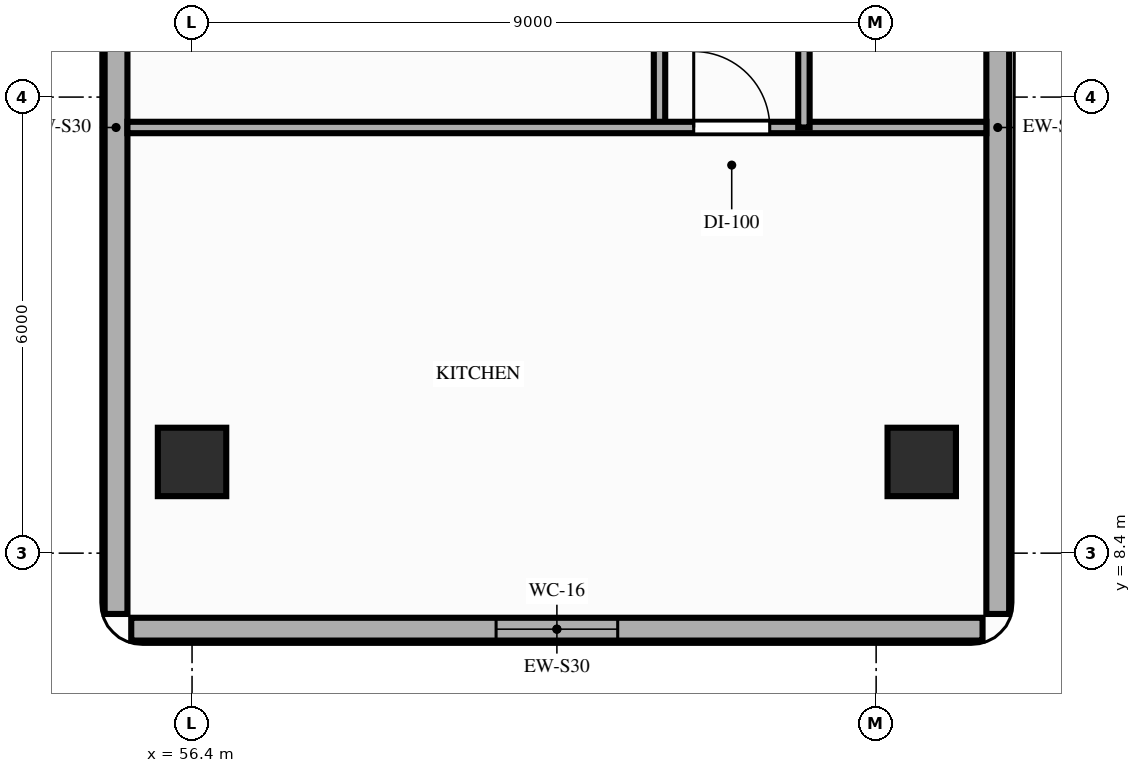
"""IFC4 building model, lengths in metres.
Left out: names, types, materials, properties, quantities, classifications, styles, units other than length and angle.
Written with IfcOpenShell. Run it as: python <this file> out.ifc"""

import sys

from ifc_helpers import new_model, si_unit, direction, frame, frame_2d, origin, origin_2d, place, context, subcontext, project, spatial, rectangle, extrude, element, fill, save


model = new_model("IFC4")
c1 = context("Model", 3, precision=1e-05, world=origin(), true_north=direction((0.0, 1.0)))
c2 = subcontext(c1, "Body", "Model", "MODEL_VIEW")
j1 = project(units=[si_unit("LENGTHUNIT", "METRE"), si_unit("PLANEANGLEUNIT", "RADIAN")], contexts=[c1])
p1 = place(None, origin())
s1 = spatial("IfcSite", under=j1, at=p1, CompositionType="ELEMENT")
p2 = place(p1, origin())
s2 = spatial("IfcBuilding", under=s1, at=p2, CompositionType="ELEMENT")
p3 = place(p2, frame((0.0, 0.0, 75.6)))
s3 = spatial("IfcBuildingStorey", under=s2, at=p3, CompositionType="ELEMENT", Elevation=75.6)
for number, where, z_axis, x_axis in (
    (1, (56.4, 9.6, 0.0), (0.0, 0.0, 1.0), (1.0, 0.0, 0.0)),
    (2, (66.0, 9.6, 0.0), (0.0, 0.0, 1.0), (1.0, 0.0, 0.0)),
):
    element("IfcColumn", number, at=place(p3, frame(where, z_axis=z_axis, x_axis=x_axis)), inside=s3, PredefinedType="COLUMN", context=c2, shape_type="SweptSolid", body=[
        extrude(rectangle(XDim=0.9, YDim=0.9, at=origin_2d()), origin(), (0.0, 0.0, 1.0), 3.8),
    ])
p4 = place(p3, frame((55.6, 7.4, 0.0), z_axis=(0.0, 0.0, 1.0), x_axis=(1.0, 0.0, 0.0)))
e3 = element("IfcWall", 3, at=p4, inside=s3, PredefinedType="STANDARD", context=c2, shape_type="SweptSolid", body=[
    extrude(rectangle(XDim=11.2, YDim=0.3, at=frame_2d((5.6, 0.0))), origin(), (0.0, 0.0, 1.0), 3.56),
])
p5 = place(p4, frame((4.8, 0.0, 0.85)))
e4 = element("IfcOpeningElement", 4, at=p5, cuts=e3, PredefinedType="OPENING", context=c2, shape_type="SweptSolid", body=[
    extrude(rectangle(XDim=1.6, YDim=1.7, at=frame_2d((0.8, 0.85))), frame((0.0, 0.16, 0.0), z_axis=(0.0, -1.0, 0.0), x_axis=(1.0, 0.0, 0.0)), (0.0, 0.0, 1.0), 0.32),
])
for number, where, z_axis, x_axis in (
    (5, (55.4, 20.4, 0.0), (0.0, 0.0, 1.0), (0.0, -1.0, 0.0)),
    (6, (67.0, 7.6, 0.0), (0.0, 0.0, 1.0), (0.0, 1.0, 0.0)),
):
    element("IfcWall", number, at=place(p3, frame(where, z_axis=z_axis, x_axis=x_axis)), inside=s3, PredefinedType="STANDARD", context=c2, shape_type="SweptSolid", body=[
        extrude(rectangle(XDim=12.8, YDim=0.3, at=frame_2d((6.4, 0.0))), origin(), (0.0, 0.0, 1.0), 3.56),
    ])
p6 = place(p3, frame((62.55, 14.0, 0.0), z_axis=(0.0, 0.0, 1.0), x_axis=(0.0, 1.0, 0.0)))
e7 = element("IfcWall", 7, at=p6, inside=s3, PredefinedType="PARTITIONING", context=c2, shape_type="SweptSolid", body=[
    extrude(rectangle(XDim=6.75, YDim=0.15, at=frame_2d((3.375, 0.0))), origin(), (0.0, 0.0, 1.0), 3.14),
])
p7 = place(p6, frame((2.6, 0.0, 0.0)))
e8 = element("IfcOpeningElement", 8, at=p7, cuts=e7, PredefinedType="OPENING", context=c2, shape_type="SweptSolid", body=[
    extrude(rectangle(XDim=0.95, YDim=2.15, at=frame_2d((0.475, 1.075))), frame((0.0, 0.085, 0.0), z_axis=(0.0, -1.0, 0.0), x_axis=(1.0, 0.0, 0.0)), (0.0, 0.0, 1.0), 0.17),
])
p8 = place(p3, frame((55.55, 14.0, 0.0), z_axis=(0.0, 0.0, 1.0), x_axis=(1.0, 0.0, 0.0)))
e9 = element("IfcWall", 9, at=p8, inside=s3, PredefinedType="PARTITIONING", context=c2, shape_type="SweptSolid", body=[
    extrude(rectangle(XDim=11.3, YDim=0.15, at=frame_2d((5.65, 0.0))), origin(), (0.0, 0.0, 1.0), 3.14),
])
p9 = place(p8, frame((7.45, 0.0, 0.0)))
e10 = element("IfcOpeningElement", 10, at=p9, cuts=e9, PredefinedType="OPENING", context=c2, shape_type="SweptSolid", body=[
    extrude(rectangle(XDim=1.0, YDim=2.15, at=frame_2d((0.5, 1.075))), frame((0.0, 0.085, 0.0), z_axis=(0.0, -1.0, 0.0), x_axis=(1.0, 0.0, 0.0)), (0.0, 0.0, 1.0), 0.17),
])
p10 = place(p3, frame((64.45, 14.0, 0.0), z_axis=(0.0, 0.0, 1.0), x_axis=(0.0, 1.0, 0.0)))
e11 = element("IfcWall", 11, at=p10, inside=s3, PredefinedType="PARTITIONING", context=c2, shape_type="SweptSolid", body=[
    extrude(rectangle(XDim=6.75, YDim=0.15, at=frame_2d((3.375, 0.0))), origin(), (0.0, 0.0, 1.0), 3.14),
])
p11 = place(p10, frame((3.24, 0.0, 0.0)))
e12 = element("IfcOpeningElement", 12, at=p11, cuts=e11, PredefinedType="OPENING", context=c2, shape_type="SweptSolid", body=[
    extrude(rectangle(XDim=0.95, YDim=2.15, at=frame_2d((0.475, 1.075))), frame((0.0, 0.085, 0.0), z_axis=(0.0, -1.0, 0.0), x_axis=(1.0, 0.0, 0.0)), (0.0, 0.0, 1.0), 0.17),
])
p12 = place(p5, origin())
e13 = element("IfcWindow", 13, at=p12, inside=s3, PartitioningType="SINGLE_PANEL", PredefinedType="WINDOW", context=c2, shape_type="SweptSolid", body=[
    extrude(rectangle(XDim=1.6, YDim=1.7, at=frame_2d((0.8, 0.85))), frame((0.0, 0.03, 0.0), z_axis=(0.0, -1.0, 0.0), x_axis=(1.0, 0.0, 0.0)), (0.0, 0.0, 1.0), 0.06),
])
fill(e4, e13)
p13 = place(p9, origin())
e14 = element("IfcDoor", 14, at=p13, inside=s3, OperationType="SINGLE_SWING_LEFT", PredefinedType="DOOR", context=c2, shape_type="SweptSolid", body=[
    extrude(rectangle(XDim=1.0, YDim=2.15, at=frame_2d((0.5, 1.075))), frame((0.0, 0.025, 0.0), z_axis=(0.0, -1.0, 0.0), x_axis=(1.0, 0.0, 0.0)), (0.0, 0.0, 1.0), 0.05),
])
fill(e10, e14)
save(model, sys.argv[1])
